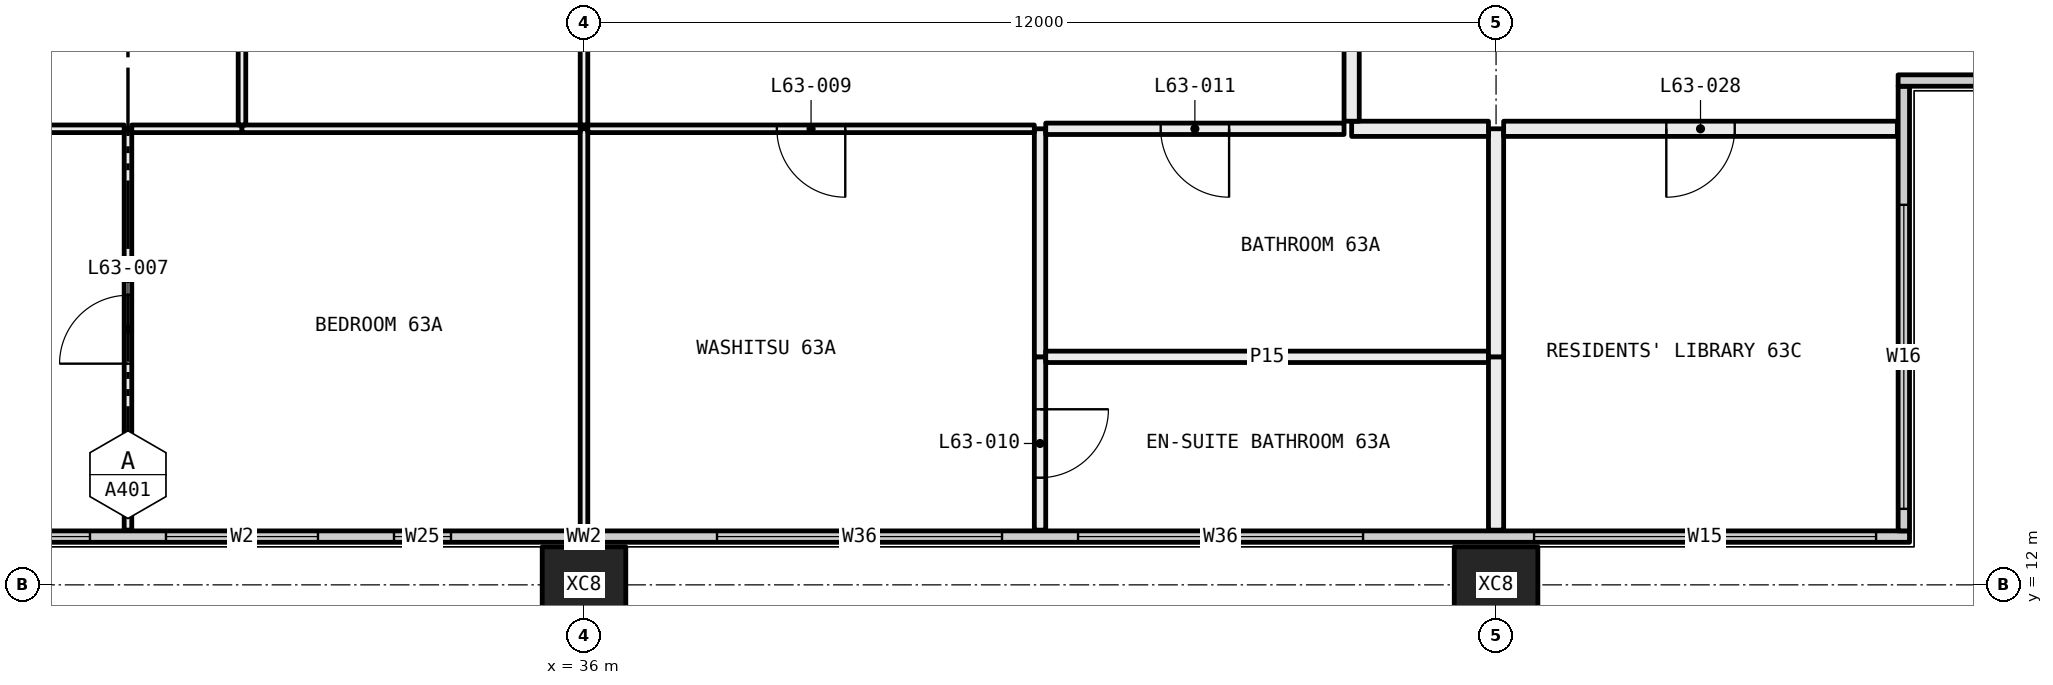
"""IFC4 building model, lengths in metres.
Left out: names, types, materials, properties, quantities, classifications, styles, units other than length and angle.
Written with IfcOpenShell. Run it as: python <this file> out.ifc"""

import sys

from ifc_helpers import new_model, si_unit, direction, frame, frame_2d, origin, origin_2d, place, context, subcontext, project, spatial, rectangle, hollow_rectangle, extrude, element, fill, save


model = new_model("IFC4")
c1 = context("Model", 3, precision=1e-05, world=origin(), true_north=direction((0.0, 1.0)))
c2 = subcontext(c1, "Body", "Model", "MODEL_VIEW")
j1 = project(units=[si_unit("LENGTHUNIT", "METRE"), si_unit("PLANEANGLEUNIT", "RADIAN")], contexts=[c1])
p1 = place(None, origin())
s1 = spatial("IfcSite", under=j1, at=p1, CompositionType="ELEMENT")
p2 = place(p1, origin())
s2 = spatial("IfcBuilding", under=s1, at=p2, CompositionType="ELEMENT")
p3 = place(p2, frame((0.0, 0.0, 235.2)))
s3 = spatial("IfcBuildingStorey", under=s2, at=p3, CompositionType="ELEMENT", Elevation=235.2)
for number, where, z_axis, x_axis in (
    (1, (36.0, 12.0, -0.4), (0.0, 0.0, 1.0), (1.0, 0.0, 0.0)),
    (2, (48.0, 12.0, -0.4), (0.0, 0.0, 1.0), (1.0, 0.0, 0.0)),
):
    element("IfcColumn", number, at=place(p3, frame(where, z_axis=z_axis, x_axis=x_axis)), inside=s3, PredefinedType="COLUMN", context=c2, shape_type="SweptSolid", body=[
        extrude(hollow_rectangle(XDim=1.1, YDim=1.0, WallThickness=0.04, at=origin_2d()), origin(), (0.0, 0.0, 1.0), 3.45),
    ])
p4 = place(p3, frame((18.56, 12.635, 0.0), z_axis=(0.0, 0.0, 1.0), x_axis=(1.0, 0.0, 0.0)))
e3 = element("IfcWall", 3, at=p4, inside=s3, PredefinedType="ELEMENTEDWALL", context=c2, shape_type="SweptSolid", body=[
    extrude(rectangle(XDim=34.88, YDim=0.15, at=frame_2d((17.44, 0.0))), origin(), (0.0, 0.0, 1.0), 3.05),
])
p5 = place(p4, frame((0.44, 0.0, 0.45)))
e4 = element("IfcOpeningElement", 4, at=p5, cuts=e3, PredefinedType="OPENING", context=c2, shape_type="SweptSolid", body=[
    extrude(rectangle(XDim=4.5, YDim=2.55, at=frame_2d((2.25, 1.275))), frame((0.0, 0.085, 0.0), z_axis=(0.0, -1.0, 0.0), x_axis=(1.0, 0.0, 0.0)), (0.0, 0.0, 1.0), 0.17),
])
p6 = place(p4, frame((7.19, 0.0, 0.45)))
e5 = element("IfcOpeningElement", 5, at=p6, cuts=e3, PredefinedType="OPENING", context=c2, shape_type="SweptSolid", body=[
    extrude(rectangle(XDim=3.75, YDim=2.55, at=frame_2d((1.875, 1.275))), frame((0.0, 0.085, 0.0), z_axis=(0.0, -1.0, 0.0), x_axis=(1.0, 0.0, 0.0)), (0.0, 0.0, 1.0), 0.17),
])
p7 = place(p4, frame((11.94, 0.0, 0.45)))
e6 = element("IfcOpeningElement", 6, at=p7, cuts=e3, PredefinedType="OPENING", context=c2, shape_type="SweptSolid", body=[
    extrude(rectangle(XDim=2.0, YDim=2.55, at=frame_2d((1.0, 1.275))), frame((0.0, 0.085, 0.0), z_axis=(0.0, -1.0, 0.0), x_axis=(1.0, 0.0, 0.0)), (0.0, 0.0, 1.0), 0.17),
])
p8 = place(p4, frame((14.94, 0.0, 0.45)))
e7 = element("IfcOpeningElement", 7, at=p8, cuts=e3, PredefinedType="OPENING", context=c2, shape_type="SweptSolid", body=[
    extrude(rectangle(XDim=0.75, YDim=2.55, at=frame_2d((0.375, 1.275))), frame((0.0, 0.085, 0.0), z_axis=(0.0, -1.0, 0.0), x_axis=(1.0, 0.0, 0.0)), (0.0, 0.0, 1.0), 0.17),
])
p9 = place(p4, frame((19.19, 0.0, 0.45)))
e8 = element("IfcOpeningElement", 8, at=p9, cuts=e3, PredefinedType="OPENING", context=c2, shape_type="SweptSolid", body=[
    extrude(rectangle(XDim=3.75, YDim=2.55, at=frame_2d((1.875, 1.275))), frame((0.0, 0.085, 0.0), z_axis=(0.0, -1.0, 0.0), x_axis=(1.0, 0.0, 0.0)), (0.0, 0.0, 1.0), 0.17),
])
p10 = place(p4, frame((23.94, 0.0, 0.45)))
e9 = element("IfcOpeningElement", 9, at=p10, cuts=e3, PredefinedType="OPENING", context=c2, shape_type="SweptSolid", body=[
    extrude(rectangle(XDim=3.75, YDim=2.55, at=frame_2d((1.875, 1.275))), frame((0.0, 0.085, 0.0), z_axis=(0.0, -1.0, 0.0), x_axis=(1.0, 0.0, 0.0)), (0.0, 0.0, 1.0), 0.17),
])
p11 = place(p4, frame((29.94, 0.0, 0.45)))
e10 = element("IfcOpeningElement", 10, at=p11, cuts=e3, PredefinedType="OPENING", context=c2, shape_type="SweptSolid", body=[
    extrude(rectangle(XDim=4.5, YDim=2.55, at=frame_2d((2.25, 1.275))), frame((0.0, 0.085, 0.0), z_axis=(0.0, -1.0, 0.0), x_axis=(1.0, 0.0, 0.0)), (0.0, 0.0, 1.0), 0.17),
])
p12 = place(p3, frame((53.365, 12.71, 0.0), z_axis=(0.0, 0.0, 1.0), x_axis=(0.0, 1.0, 0.0)))
e11 = element("IfcWall", 11, at=p12, inside=s3, PredefinedType="ELEMENTEDWALL", context=c2, shape_type="SweptSolid", body=[
    extrude(rectangle(XDim=5.85, YDim=0.15, at=frame_2d((2.925, 0.0))), origin(), (0.0, 0.0, 1.0), 3.05),
])
p13 = place(p12, frame((0.29, 0.0, 0.45)))
e12 = element("IfcOpeningElement", 12, at=p13, cuts=e11, PredefinedType="OPENING", context=c2, shape_type="SweptSolid", body=[
    extrude(rectangle(XDim=4.0, YDim=2.55, at=frame_2d((2.0, 1.275))), frame((0.0, 0.085, 0.0), z_axis=(0.0, -1.0, 0.0), x_axis=(1.0, 0.0, 0.0)), (0.0, 0.0, 1.0), 0.17),
])
p14 = place(p3, frame((53.29, 18.635, 0.0), z_axis=(0.0, 0.0, 1.0), x_axis=(1.0, 0.0, 0.0)))
e13 = element("IfcWall", 13, at=p14, inside=s3, PredefinedType="ELEMENTEDWALL", context=c2, shape_type="SweptSolid", body=[
    extrude(rectangle(XDim=6.15, YDim=0.15, at=frame_2d((3.075, 0.0))), origin(), (0.0, 0.0, 1.0), 3.05),
])
p15 = place(p14, frame((1.71, 0.0, 0.45)))
e14 = element("IfcOpeningElement", 14, at=p15, cuts=e13, PredefinedType="OPENING", context=c2, shape_type="SweptSolid", body=[
    extrude(rectangle(XDim=4.0, YDim=2.55, at=frame_2d((2.0, 1.275))), frame((0.0, 0.085, 0.0), z_axis=(0.0, -1.0, 0.0), x_axis=(1.0, 0.0, 0.0)), (0.0, 0.0, 1.0), 0.17),
])
p16 = place(p3, frame((30.0, 12.72, 0.0), z_axis=(0.0, 0.0, 1.0), x_axis=(0.0, 1.0, 0.0)))
e15 = element("IfcWall", 15, at=p16, inside=s3, PredefinedType="PARTITIONING", context=c2, shape_type="SweptSolid", body=[
    extrude(rectangle(XDim=5.28, YDim=0.1, at=frame_2d((2.64, 0.0))), origin(), (0.0, 0.0, 1.0), 3.05),
])
p17 = place(p16, frame((2.19, 0.0, 0.0)))
e16 = element("IfcOpeningElement", 16, at=p17, cuts=e15, PredefinedType="OPENING", context=c2, shape_type="SweptSolid", body=[
    extrude(rectangle(XDim=0.9, YDim=2.1, at=frame_2d((0.45, 1.05))), frame((0.0, 0.06, 0.0), z_axis=(0.0, -1.0, 0.0), x_axis=(1.0, 0.0, 0.0)), (0.0, 0.0, 1.0), 0.12),
])
p18 = place(p3, frame((29.95, 18.0, 0.0), z_axis=(0.0, 0.0, 1.0), x_axis=(-1.0, 0.0, 0.0)))
e17 = element("IfcWall", 17, at=p18, inside=s3, PredefinedType="PARTITIONING", context=c2, shape_type="SweptSolid", body=[
    extrude(rectangle(XDim=3.95, YDim=0.1, at=frame_2d((1.975, 0.0))), origin(), (0.0, 0.0, 1.0), 3.05),
])
p19 = place(p18, frame((1.525, 0.0, 0.0)))
e18 = element("IfcOpeningElement", 18, at=p19, cuts=e17, PredefinedType="OPENING", context=c2, shape_type="SweptSolid", body=[
    extrude(rectangle(XDim=0.9, YDim=2.1, at=frame_2d((0.45, 1.05))), frame((0.0, 0.06, 0.0), z_axis=(0.0, -1.0, 0.0), x_axis=(1.0, 0.0, 0.0)), (0.0, 0.0, 1.0), 0.12),
])
p20 = place(p3, frame((36.0, 12.72, 0.0), z_axis=(0.0, 0.0, 1.0), x_axis=(0.0, 1.0, 0.0)))
e19 = element("IfcWall", 19, at=p20, inside=s3, PredefinedType="PARTITIONING", context=c2, shape_type="SweptSolid", body=[
    extrude(rectangle(XDim=5.28, YDim=0.1, at=frame_2d((2.64, 0.0))), origin(), (0.0, 0.0, 1.0), 2.45),
])
p21 = place(p3, frame((31.5, 18.0, 0.0), z_axis=(0.0, 0.0, 1.0), x_axis=(-1.0, 0.0, 0.0)))
e20 = element("IfcWall", 20, at=p21, inside=s3, PredefinedType="PARTITIONING", context=c2, shape_type="SweptSolid", body=[
    extrude(rectangle(XDim=1.45, YDim=0.1, at=frame_2d((0.725, 0.0))), origin(), (0.0, 0.0, 1.0), 3.05),
])
p22 = place(p3, frame((35.95, 18.0, 0.0), z_axis=(0.0, 0.0, 1.0), x_axis=(-1.0, 0.0, 0.0)))
e21 = element("IfcWall", 21, at=p22, inside=s3, PredefinedType="PARTITIONING", context=c2, shape_type="SweptSolid", body=[
    extrude(rectangle(XDim=4.45, YDim=0.1, at=frame_2d((2.225, 0.0))), origin(), (0.0, 0.0, 1.0), 2.45),
])
p23 = place(p3, frame((42.0, 12.72, 0.0), z_axis=(0.0, 0.0, 1.0), x_axis=(0.0, 1.0, 0.0)))
e22 = element("IfcWall", 22, at=p23, inside=s3, PredefinedType="PARTITIONING", context=c2, shape_type="SweptSolid", body=[
    extrude(rectangle(XDim=2.28, YDim=0.15, at=frame_2d((1.14, 0.0))), origin(), (0.0, 0.0, 1.0), 3.05),
])
p24 = place(p23, frame((0.69, 0.0, 0.0)))
e23 = element("IfcOpeningElement", 23, at=p24, cuts=e22, PredefinedType="OPENING", context=c2, shape_type="SweptSolid", body=[
    extrude(rectangle(XDim=0.9, YDim=2.1, at=frame_2d((0.45, 1.05))), frame((0.0, 0.085, 0.0), z_axis=(0.0, -1.0, 0.0), x_axis=(1.0, 0.0, 0.0)), (0.0, 0.0, 1.0), 0.17),
])
p25 = place(p3, frame((42.0, 15.0, 0.0), z_axis=(0.0, 0.0, 1.0), x_axis=(0.0, 1.0, 0.0)))
e24 = element("IfcWall", 24, at=p25, inside=s3, PredefinedType="PARTITIONING", context=c2, shape_type="SweptSolid", body=[
    extrude(rectangle(XDim=3.0, YDim=0.15, at=frame_2d((1.5, 0.0))), origin(), (0.0, 0.0, 1.0), 3.05),
])
p26 = place(p3, frame((41.925, 18.0, 0.0), z_axis=(0.0, 0.0, 1.0), x_axis=(-1.0, 0.0, 0.0)))
e25 = element("IfcWall", 25, at=p26, inside=s3, PredefinedType="PARTITIONING", context=c2, shape_type="SweptSolid", body=[
    extrude(rectangle(XDim=5.875, YDim=0.1, at=frame_2d((2.938, 0.0))), origin(), (0.0, 0.0, 1.0), 2.45),
])
p27 = place(p26, frame((2.488, 0.0, 0.0)))
e26 = element("IfcOpeningElement", 26, at=p27, cuts=e25, PredefinedType="OPENING", context=c2, shape_type="SweptSolid", body=[
    extrude(rectangle(XDim=0.9, YDim=2.1, at=frame_2d((0.45, 1.05))), frame((0.0, 0.06, 0.0), z_axis=(0.0, -1.0, 0.0), x_axis=(1.0, 0.0, 0.0)), (0.0, 0.0, 1.0), 0.12),
])
p28 = place(p3, frame((47.9, 15.0, 0.0), z_axis=(0.0, 0.0, 1.0), x_axis=(-1.0, 0.0, 0.0)))
e27 = element("IfcWall", 27, at=p28, inside=s3, PredefinedType="PARTITIONING", context=c2, shape_type="SweptSolid", body=[
    extrude(rectangle(XDim=5.825, YDim=0.15, at=frame_2d((2.913, 0.0))), origin(), (0.0, 0.0, 1.0), 3.05),
])
p29 = place(p3, frame((48.0, 12.72, 0.0), z_axis=(0.0, 0.0, 1.0), x_axis=(0.0, 1.0, 0.0)))
e28 = element("IfcWall", 28, at=p29, inside=s3, PredefinedType="PARTITIONING", context=c2, shape_type="SweptSolid", body=[
    extrude(rectangle(XDim=2.28, YDim=0.2, at=frame_2d((1.14, 0.0))), origin(), (0.0, 0.0, 1.0), 3.05),
])
p30 = place(p3, frame((46.0, 18.0, 0.0), z_axis=(0.0, 0.0, 1.0), x_axis=(-1.0, 0.0, 0.0)))
e29 = element("IfcWall", 29, at=p30, inside=s3, PredefinedType="PARTITIONING", context=c2, shape_type="SweptSolid", body=[
    extrude(rectangle(XDim=3.925, YDim=0.15, at=frame_2d((1.962, 0.0))), origin(), (0.0, 0.0, 1.0), 3.05),
])
p31 = place(p30, frame((1.512, 0.0, 0.0)))
e30 = element("IfcOpeningElement", 30, at=p31, cuts=e29, PredefinedType="OPENING", context=c2, shape_type="SweptSolid", body=[
    extrude(rectangle(XDim=0.9, YDim=2.1, at=frame_2d((0.45, 1.05))), frame((0.0, 0.085, 0.0), z_axis=(0.0, -1.0, 0.0), x_axis=(1.0, 0.0, 0.0)), (0.0, 0.0, 1.0), 0.17),
])
p32 = place(p3, frame((48.0, 15.0, 0.0), z_axis=(0.0, 0.0, 1.0), x_axis=(0.0, 1.0, 0.0)))
e31 = element("IfcWall", 31, at=p32, inside=s3, PredefinedType="PARTITIONING", context=c2, shape_type="SweptSolid", body=[
    extrude(rectangle(XDim=3.0, YDim=0.2, at=frame_2d((1.5, 0.0))), origin(), (0.0, 0.0, 1.0), 3.05),
])
p33 = place(p3, frame((47.9, 18.0, 0.0), z_axis=(0.0, 0.0, 1.0), x_axis=(-1.0, 0.0, 0.0)))
e32 = element("IfcWall", 32, at=p33, inside=s3, PredefinedType="PARTITIONING", context=c2, shape_type="SweptSolid", body=[
    extrude(rectangle(XDim=1.8, YDim=0.2, at=frame_2d((0.9, 0.0))), origin(), (0.0, 0.0, 1.0), 3.05),
])
p34 = place(p3, frame((31.5, 18.05, 0.0), z_axis=(0.0, 0.0, 1.0), x_axis=(0.0, 1.0, 0.0)))
e33 = element("IfcWall", 33, at=p34, inside=s3, PredefinedType="PARTITIONING", context=c2, shape_type="SweptSolid", body=[
    extrude(rectangle(XDim=6.175, YDim=0.1, at=frame_2d((3.087, 0.0))), origin(), (0.0, 0.0, 1.0), 2.45),
])
p35 = place(p34, frame((2.637, 0.0, 0.0)))
e34 = element("IfcOpeningElement", 34, at=p35, cuts=e33, PredefinedType="OPENING", context=c2, shape_type="SweptSolid", body=[
    extrude(rectangle(XDim=0.9, YDim=2.1, at=frame_2d((0.45, 1.05))), frame((0.0, 0.06, 0.0), z_axis=(0.0, -1.0, 0.0), x_axis=(1.0, 0.0, 0.0)), (0.0, 0.0, 1.0), 0.12),
])
p36 = place(p3, frame((36.0, 18.05, 0.0), z_axis=(0.0, 0.0, 1.0), x_axis=(0.0, 1.0, 0.0)))
e35 = element("IfcWall", 35, at=p36, inside=s3, PredefinedType="PARTITIONING", context=c2, shape_type="SweptSolid", body=[
    extrude(rectangle(XDim=5.4, YDim=0.1, at=frame_2d((2.7, 0.0))), origin(), (0.0, 0.0, 1.0), 2.45),
])
p37 = place(p36, frame((2.25, 0.0, 0.0)))
e36 = element("IfcOpeningElement", 36, at=p37, cuts=e35, PredefinedType="OPENING", context=c2, shape_type="SweptSolid", body=[
    extrude(rectangle(XDim=0.9, YDim=2.1, at=frame_2d((0.45, 1.05))), frame((0.0, 0.06, 0.0), z_axis=(0.0, -1.0, 0.0), x_axis=(1.0, 0.0, 0.0)), (0.0, 0.0, 1.0), 0.12),
])
p38 = place(p3, frame((46.1, 18.1, 0.0), z_axis=(0.0, 0.0, 1.0), x_axis=(0.0, 1.0, 0.0)))
e37 = element("IfcWall", 37, at=p38, inside=s3, PredefinedType="PARTITIONING", context=c2, shape_type="SweptSolid", body=[
    extrude(rectangle(XDim=6.2, YDim=0.2, at=frame_2d((3.1, 0.0))), origin(), (0.0, 0.0, 1.0), 2.45),
])
p39 = place(p3, frame((53.28, 18.0, 0.0), z_axis=(0.0, 0.0, 1.0), x_axis=(-1.0, 0.0, 0.0)))
e38 = element("IfcWall", 38, at=p39, inside=s3, PredefinedType="PARTITIONING", context=c2, shape_type="SweptSolid", body=[
    extrude(rectangle(XDim=5.18, YDim=0.2, at=frame_2d((2.59, 0.0))), origin(), (0.0, 0.0, 1.0), 3.05),
])
p40 = place(p39, frame((2.14, 0.0, 0.0)))
e39 = element("IfcOpeningElement", 39, at=p40, cuts=e38, PredefinedType="OPENING", context=c2, shape_type="SweptSolid", body=[
    extrude(rectangle(XDim=0.9, YDim=2.1, at=frame_2d((0.45, 1.05))), frame((0.0, 0.11, 0.0), z_axis=(0.0, -1.0, 0.0), x_axis=(1.0, 0.0, 0.0)), (0.0, 0.0, 1.0), 0.22),
])
p41 = place(p6, origin())
e40 = element("IfcWindow", 40, at=p41, inside=s3, PartitioningType="SINGLE_PANEL", PredefinedType="WINDOW", context=c2, shape_type="SweptSolid", body=[
    extrude(rectangle(XDim=3.75, YDim=2.55, at=frame_2d((1.875, 1.275))), frame((0.0, 0.03, 0.0), z_axis=(0.0, -1.0, 0.0), x_axis=(1.0, 0.0, 0.0)), (0.0, 0.0, 1.0), 0.06),
])
fill(e5, e40)
p42 = place(p7, origin())
e41 = element("IfcWindow", 41, at=p42, inside=s3, PartitioningType="SINGLE_PANEL", PredefinedType="WINDOW", context=c2, shape_type="SweptSolid", body=[
    extrude(rectangle(XDim=2.0, YDim=2.55, at=frame_2d((1.0, 1.275))), frame((0.0, 0.03, 0.0), z_axis=(0.0, -1.0, 0.0), x_axis=(1.0, 0.0, 0.0)), (0.0, 0.0, 1.0), 0.06),
])
fill(e6, e41)
p43 = place(p8, origin())
e42 = element("IfcWindow", 42, at=p43, inside=s3, PartitioningType="SINGLE_PANEL", PredefinedType="WINDOW", context=c2, shape_type="SweptSolid", body=[
    extrude(rectangle(XDim=0.75, YDim=2.55, at=frame_2d((0.375, 1.275))), frame((0.0, 0.03, 0.0), z_axis=(0.0, -1.0, 0.0), x_axis=(1.0, 0.0, 0.0)), (0.0, 0.0, 1.0), 0.06),
])
fill(e7, e42)
p44 = place(p9, origin())
e43 = element("IfcWindow", 43, at=p44, inside=s3, PartitioningType="SINGLE_PANEL", PredefinedType="WINDOW", context=c2, shape_type="SweptSolid", body=[
    extrude(rectangle(XDim=3.75, YDim=2.55, at=frame_2d((1.875, 1.275))), frame((0.0, 0.03, 0.0), z_axis=(0.0, -1.0, 0.0), x_axis=(1.0, 0.0, 0.0)), (0.0, 0.0, 1.0), 0.06),
])
fill(e8, e43)
p45 = place(p10, origin())
e44 = element("IfcWindow", 44, at=p45, inside=s3, PartitioningType="SINGLE_PANEL", PredefinedType="WINDOW", context=c2, shape_type="SweptSolid", body=[
    extrude(rectangle(XDim=3.75, YDim=2.55, at=frame_2d((1.875, 1.275))), frame((0.0, 0.03, 0.0), z_axis=(0.0, -1.0, 0.0), x_axis=(1.0, 0.0, 0.0)), (0.0, 0.0, 1.0), 0.06),
])
fill(e9, e44)
p46 = place(p11, origin())
e45 = element("IfcWindow", 45, at=p46, inside=s3, PartitioningType="SINGLE_PANEL", PredefinedType="WINDOW", context=c2, shape_type="SweptSolid", body=[
    extrude(rectangle(XDim=4.5, YDim=2.55, at=frame_2d((2.25, 1.275))), frame((0.0, 0.03, 0.0), z_axis=(0.0, -1.0, 0.0), x_axis=(1.0, 0.0, 0.0)), (0.0, 0.0, 1.0), 0.06),
])
fill(e10, e45)
p47 = place(p13, origin())
e46 = element("IfcWindow", 46, at=p47, inside=s3, PartitioningType="SINGLE_PANEL", PredefinedType="WINDOW", context=c2, shape_type="SweptSolid", body=[
    extrude(rectangle(XDim=4.0, YDim=2.55, at=frame_2d((2.0, 1.275))), frame((0.0, 0.03, 0.0), z_axis=(0.0, -1.0, 0.0), x_axis=(1.0, 0.0, 0.0)), (0.0, 0.0, 1.0), 0.06),
])
fill(e12, e46)
p48 = place(p17, origin())
e47 = element("IfcDoor", 47, at=p48, inside=s3, OperationType="SINGLE_SWING_RIGHT", PredefinedType="DOOR", context=c2, shape_type="SweptSolid", body=[
    extrude(rectangle(XDim=0.9, YDim=2.1, at=frame_2d((0.45, 1.05))), frame((0.0, 0.025, 0.0), z_axis=(0.0, -1.0, 0.0), x_axis=(1.0, 0.0, 0.0)), (0.0, 0.0, 1.0), 0.05),
])
fill(e16, e47)
p49 = place(p27, origin())
e48 = element("IfcDoor", 48, at=p49, inside=s3, OperationType="SINGLE_SWING_RIGHT", PredefinedType="DOOR", context=c2, shape_type="SweptSolid", body=[
    extrude(rectangle(XDim=0.9, YDim=2.1, at=frame_2d((0.45, 1.05))), frame((0.0, 0.025, 0.0), z_axis=(0.0, -1.0, 0.0), x_axis=(1.0, 0.0, 0.0)), (0.0, 0.0, 1.0), 0.05),
])
fill(e26, e48)
p50 = place(p24, frame((0.9, 0.0, 0.0), x_axis=(-1.0, 0.0, 0.0)))
e49 = element("IfcDoor", 49, at=p50, inside=s3, OperationType="SINGLE_SWING_RIGHT", PredefinedType="DOOR", context=c2, shape_type="SweptSolid", body=[
    extrude(rectangle(XDim=0.9, YDim=2.1, at=frame_2d((0.45, 1.05))), frame((0.0, 0.025, 0.0), z_axis=(0.0, -1.0, 0.0), x_axis=(1.0, 0.0, 0.0)), (0.0, 0.0, 1.0), 0.05),
])
fill(e23, e49)
p51 = place(p31, origin())
e50 = element("IfcDoor", 50, at=p51, inside=s3, OperationType="SINGLE_SWING_RIGHT", PredefinedType="DOOR", context=c2, shape_type="SweptSolid", body=[
    extrude(rectangle(XDim=0.9, YDim=2.1, at=frame_2d((0.45, 1.05))), frame((0.0, 0.025, 0.0), z_axis=(0.0, -1.0, 0.0), x_axis=(1.0, 0.0, 0.0)), (0.0, 0.0, 1.0), 0.05),
])
fill(e30, e50)
p52 = place(p40, origin())
e51 = element("IfcDoor", 51, at=p52, inside=s3, OperationType="SINGLE_SWING_LEFT", PredefinedType="DOOR", context=c2, shape_type="SweptSolid", body=[
    extrude(rectangle(XDim=0.9, YDim=2.1, at=frame_2d((0.45, 1.05))), frame((0.0, 0.025, 0.0), z_axis=(0.0, -1.0, 0.0), x_axis=(1.0, 0.0, 0.0)), (0.0, 0.0, 1.0), 0.05),
])
fill(e39, e51)
save(model, sys.argv[1])
